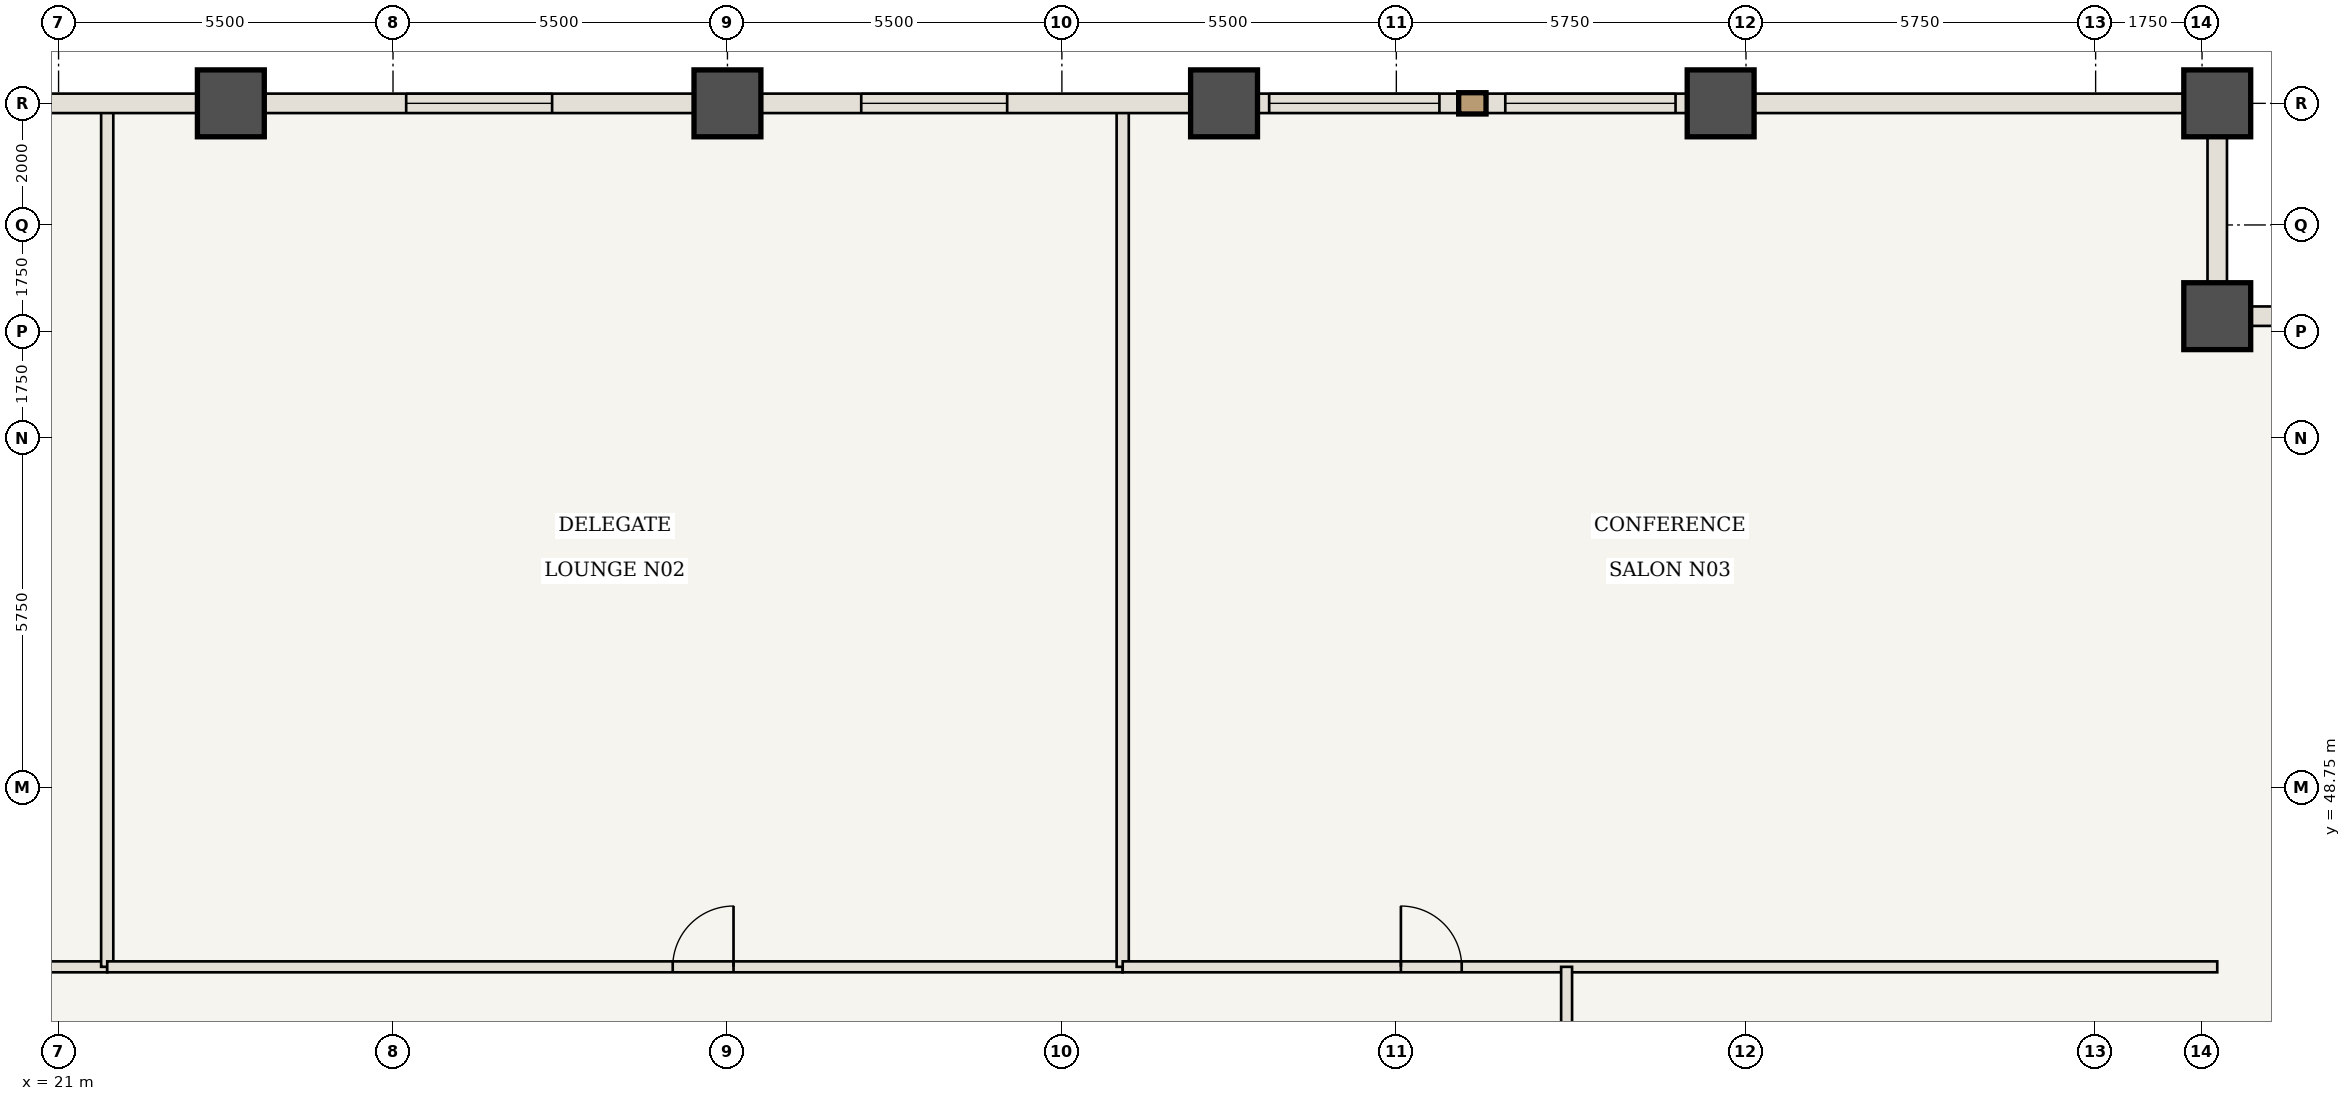
"""IFC4 building model, lengths in metres.
Left out: names, types, materials, properties, quantities, classifications, styles, units other than length and angle.
Written with IfcOpenShell. Run it as: python <this file> out.ifc"""

import sys

from ifc_helpers import new_model, si_unit, direction, frame, frame_2d, origin, origin_2d, place, context, subcontext, project, spatial, rectangle, extrude, element, fill, save


model = new_model("IFC4")
c1 = context("Model", 3, precision=1e-05, world=origin(), true_north=direction((0.0, 1.0)))
c2 = subcontext(c1, "Body", "Model", "MODEL_VIEW")
j1 = project(units=[si_unit("LENGTHUNIT", "METRE"), si_unit("PLANEANGLEUNIT", "RADIAN")], contexts=[c1])
p1 = place(None, origin())
s1 = spatial("IfcSite", under=j1, at=p1, CompositionType="ELEMENT")
p2 = place(p1, origin())
s2 = spatial("IfcBuilding", under=s1, at=p2, CompositionType="ELEMENT")
p3 = place(p2, frame((0.0, 0.0, 89.25)))
s3 = spatial("IfcBuildingStorey", under=s2, at=p3, CompositionType="ELEMENT", Elevation=89.25)
for number, where, z_axis, x_axis in (
    (1, (56.5, 56.5, 0.0), (0.0, 0.0, 1.0), (1.0, 0.0, 0.0)),
    (2, (56.5, 60.0, 0.0), (0.0, 0.0, 1.0), (1.0, 0.0, 0.0)),
    (3, (23.833, 60.0, 0.0), (0.0, 0.0, 1.0), (1.0, 0.0, 0.0)),
    (4, (32.0, 60.0, 0.0), (0.0, 0.0, 1.0), (1.0, 0.0, 0.0)),
    (5, (40.167, 60.0, 0.0), (0.0, 0.0, 1.0), (1.0, 0.0, 0.0)),
    (6, (48.333, 60.0, 0.0), (0.0, 0.0, 1.0), (1.0, 0.0, 0.0)),
):
    element("IfcColumn", number, at=place(p3, frame(where, z_axis=z_axis, x_axis=x_axis)), inside=s3, PredefinedType="COLUMN", context=c2, shape_type="SweptSolid", body=[
        extrude(rectangle(XDim=1.1, YDim=1.1, at=origin_2d()), origin(), (0.0, 0.0, 1.0), 3.5),
    ])
p4 = place(p3, frame((7.5, 45.8, 0.0), z_axis=(0.0, 0.0, 1.0), x_axis=(1.0, 0.0, 0.0)))
e7 = element("IfcWall", 7, at=p4, inside=s3, PredefinedType="STANDARD", context=c2, shape_type="SweptSolid", body=[
    extrude(rectangle(XDim=14.3, YDim=0.18, at=frame_2d((7.15, 0.0))), origin(), (0.0, 0.0, 1.0), 3.32),
])
p5 = place(p4, frame((12.025, 0.0, 0.0)))
e8 = element("IfcOpeningElement", 8, at=p5, cuts=e7, PredefinedType="OPENING", context=c2, shape_type="SweptSolid", body=[
    extrude(rectangle(XDim=1.0, YDim=2.15, at=frame_2d((0.5, 1.075))), frame((0.0, 0.1, 0.0), z_axis=(0.0, -1.0, 0.0), x_axis=(1.0, 0.0, 0.0)), (0.0, 0.0, 1.0), 0.2),
])
p6 = place(p3, frame((21.8, 45.8, 0.0), z_axis=(0.0, 0.0, 1.0), x_axis=(0.0, 1.0, 0.0)))
e9 = element("IfcWall", 9, at=p6, inside=s3, PredefinedType="STANDARD", context=c2, shape_type="SweptSolid", body=[
    extrude(rectangle(XDim=14.14, YDim=0.2, at=frame_2d((7.07, 0.0))), origin(), (0.0, 0.0, 1.0), 3.32),
])
p7 = place(p3, frame((21.8, 45.8, 0.0), z_axis=(0.0, 0.0, 1.0), x_axis=(1.0, 0.0, 0.0)))
e10 = element("IfcWall", 10, at=p7, inside=s3, PredefinedType="STANDARD", context=c2, shape_type="SweptSolid", body=[
    extrude(rectangle(XDim=16.7, YDim=0.18, at=frame_2d((8.35, 0.0))), origin(), (0.0, 0.0, 1.0), 3.32),
])
p8 = place(p7, frame((9.3, 0.0, 0.0)))
e11 = element("IfcOpeningElement", 11, at=p8, cuts=e10, PredefinedType="OPENING", context=c2, shape_type="SweptSolid", body=[
    extrude(rectangle(XDim=1.0, YDim=2.15, at=frame_2d((0.5, 1.075))), frame((0.0, 0.1, 0.0), z_axis=(0.0, -1.0, 0.0), x_axis=(1.0, 0.0, 0.0)), (0.0, 0.0, 1.0), 0.2),
])
p9 = place(p3, frame((38.5, 45.8, 0.0), z_axis=(0.0, 0.0, 1.0), x_axis=(0.0, 1.0, 0.0)))
e12 = element("IfcWall", 12, at=p9, inside=s3, PredefinedType="STANDARD", context=c2, shape_type="SweptSolid", body=[
    extrude(rectangle(XDim=14.14, YDim=0.2, at=frame_2d((7.07, 0.0))), origin(), (0.0, 0.0, 1.0), 3.32),
])
p10 = place(p3, frame((38.5, 45.8, 0.0), z_axis=(0.0, 0.0, 1.0), x_axis=(1.0, 0.0, 0.0)))
e13 = element("IfcWall", 13, at=p10, inside=s3, PredefinedType="STANDARD", context=c2, shape_type="SweptSolid", body=[
    extrude(rectangle(XDim=18.0, YDim=0.18, at=frame_2d((9.0, 0.0))), origin(), (0.0, 0.0, 1.0), 3.32),
])
p11 = place(p10, frame((4.575, 0.0, 0.0)))
e14 = element("IfcOpeningElement", 14, at=p11, cuts=e13, PredefinedType="OPENING", context=c2, shape_type="SweptSolid", body=[
    extrude(rectangle(XDim=1.0, YDim=2.15, at=frame_2d((0.5, 1.075))), frame((0.0, 0.1, 0.0), z_axis=(0.0, -1.0, 0.0), x_axis=(1.0, 0.0, 0.0)), (0.0, 0.0, 1.0), 0.2),
])
p12 = place(p3, frame((45.8, 37.5, 0.0), z_axis=(0.0, 0.0, 1.0), x_axis=(0.0, 1.0, 0.0)))
e15 = element("IfcWall", 15, at=p12, inside=s3, PredefinedType="STANDARD", context=c2, shape_type="SweptSolid", body=[
    extrude(rectangle(XDim=8.3, YDim=0.18, at=frame_2d((4.15, 0.0))), origin(), (0.0, 0.0, 1.0), 3.32),
])
p13 = place(p12, frame((3.65, 0.0, 0.0)))
e16 = element("IfcOpeningElement", 16, at=p13, cuts=e15, PredefinedType="OPENING", context=c2, shape_type="SweptSolid", body=[
    extrude(rectangle(XDim=1.0, YDim=2.15, at=frame_2d((0.5, 1.075))), frame((0.0, 0.1, 0.0), z_axis=(0.0, -1.0, 0.0), x_axis=(1.0, 0.0, 0.0)), (0.0, 0.0, 1.0), 0.2),
])
p14 = place(p3, frame((15.667, 60.0, 0.0), z_axis=(0.0, 0.0, 1.0), x_axis=(1.0, 0.0, 0.0)))
e17 = element("IfcWall", 17, at=p14, inside=s3, PredefinedType="USERDEFINED", context=c2, shape_type="SweptSolid", body=[
    extrude(rectangle(XDim=8.167, YDim=0.32, at=frame_2d((4.083, 0.0))), origin(), (0.0, 0.0, 1.0), 2.52),
])
p15 = place(p14, frame((0.742, 0.0, 0.85)))
e18 = element("IfcOpeningElement", 18, at=p15, cuts=e17, PredefinedType="OPENING", context=c2, shape_type="SweptSolid", body=[
    extrude(rectangle(XDim=2.8, YDim=1.47, at=frame_2d((1.4, 0.735))), frame((0.0, 0.17, 0.0), z_axis=(0.0, -1.0, 0.0), x_axis=(1.0, 0.0, 0.0)), (0.0, 0.0, 1.0), 0.34),
])
p16 = place(p3, frame((23.833, 60.0, 0.0), z_axis=(0.0, 0.0, 1.0), x_axis=(1.0, 0.0, 0.0)))
e19 = element("IfcWall", 19, at=p16, inside=s3, PredefinedType="USERDEFINED", context=c2, shape_type="SweptSolid", body=[
    extrude(rectangle(XDim=8.167, YDim=0.32, at=frame_2d((4.083, 0.0))), origin(), (0.0, 0.0, 1.0), 2.52),
])
p17 = place(p16, frame((2.883, 0.0, 0.85)))
e20 = element("IfcOpeningElement", 20, at=p17, cuts=e19, PredefinedType="OPENING", context=c2, shape_type="SweptSolid", body=[
    extrude(rectangle(XDim=2.4, YDim=1.47, at=frame_2d((1.2, 0.735))), frame((0.0, 0.17, 0.0), z_axis=(0.0, -1.0, 0.0), x_axis=(1.0, 0.0, 0.0)), (0.0, 0.0, 1.0), 0.34),
])
p18 = place(p3, frame((32.0, 60.0, 0.0), z_axis=(0.0, 0.0, 1.0), x_axis=(1.0, 0.0, 0.0)))
e21 = element("IfcWall", 21, at=p18, inside=s3, PredefinedType="USERDEFINED", context=c2, shape_type="SweptSolid", body=[
    extrude(rectangle(XDim=8.167, YDim=0.32, at=frame_2d((4.083, 0.0))), origin(), (0.0, 0.0, 1.0), 2.52),
])
p19 = place(p18, frame((2.2, 0.0, 0.85)))
e22 = element("IfcOpeningElement", 22, at=p19, cuts=e21, PredefinedType="OPENING", context=c2, shape_type="SweptSolid", body=[
    extrude(rectangle(XDim=2.4, YDim=1.47, at=frame_2d((1.2, 0.735))), frame((0.0, 0.17, 0.0), z_axis=(0.0, -1.0, 0.0), x_axis=(1.0, 0.0, 0.0)), (0.0, 0.0, 1.0), 0.34),
])
p20 = place(p3, frame((40.167, 60.0, 0.0), z_axis=(0.0, 0.0, 1.0), x_axis=(1.0, 0.0, 0.0)))
e23 = element("IfcWall", 23, at=p20, inside=s3, PredefinedType="USERDEFINED", context=c2, shape_type="SweptSolid", body=[
    extrude(rectangle(XDim=8.167, YDim=0.32, at=frame_2d((4.083, 0.0))), origin(), (0.0, 0.0, 1.0), 2.52),
])
p21 = place(p20, frame((0.742, 0.0, 0.85)))
e24 = element("IfcOpeningElement", 24, at=p21, cuts=e23, PredefinedType="OPENING", context=c2, shape_type="SweptSolid", body=[
    extrude(rectangle(XDim=2.8, YDim=1.47, at=frame_2d((1.4, 0.735))), frame((0.0, 0.17, 0.0), z_axis=(0.0, -1.0, 0.0), x_axis=(1.0, 0.0, 0.0)), (0.0, 0.0, 1.0), 0.34),
])
p22 = place(p20, frame((4.625, 0.0, 0.85)))
e25 = element("IfcOpeningElement", 25, at=p22, cuts=e23, PredefinedType="OPENING", context=c2, shape_type="SweptSolid", body=[
    extrude(rectangle(XDim=2.8, YDim=1.47, at=frame_2d((1.4, 0.735))), frame((0.0, 0.17, 0.0), z_axis=(0.0, -1.0, 0.0), x_axis=(1.0, 0.0, 0.0)), (0.0, 0.0, 1.0), 0.34),
])
p23 = place(p3, frame((48.333, 60.0, 0.0), z_axis=(0.0, 0.0, 1.0), x_axis=(1.0, 0.0, 0.0)))
e26 = element("IfcWall", 26, at=p23, inside=s3, PredefinedType="USERDEFINED", context=c2, shape_type="SweptSolid", body=[
    extrude(rectangle(XDim=8.167, YDim=0.32, at=frame_2d((4.083, 0.0))), origin(), (0.0, 0.0, 1.0), 2.52),
])
for number, where, z_axis, x_axis in (
    (27, (56.5, 56.5, 0.0), (0.0, 0.0, 1.0), (1.0, 0.0, 0.0)),
    (28, (56.5, 60.0, 0.0), (0.0, 0.0, 1.0), (0.0, -1.0, 0.0)),
):
    element("IfcWall", number, at=place(p3, frame(where, z_axis=z_axis, x_axis=x_axis)), inside=s3, PredefinedType="USERDEFINED", context=c2, shape_type="SweptSolid", body=[
        extrude(rectangle(XDim=3.5, YDim=0.32, at=frame_2d((1.75, 0.0))), origin(), (0.0, 0.0, 1.0), 2.52),
    ])
p24 = place(p8, origin())
e29 = element("IfcDoor", 29, at=p24, inside=s3, OperationType="SINGLE_SWING_RIGHT", PredefinedType="DOOR", context=c2, shape_type="SweptSolid", body=[
    extrude(rectangle(XDim=1.0, YDim=2.15, at=frame_2d((0.5, 1.075))), frame((0.0, 0.025, 0.0), z_axis=(0.0, -1.0, 0.0), x_axis=(1.0, 0.0, 0.0)), (0.0, 0.0, 1.0), 0.05),
])
fill(e11, e29)
p25 = place(p11, origin())
e30 = element("IfcDoor", 30, at=p25, inside=s3, OperationType="SINGLE_SWING_LEFT", PredefinedType="DOOR", context=c2, shape_type="SweptSolid", body=[
    extrude(rectangle(XDim=1.0, YDim=2.15, at=frame_2d((0.5, 1.075))), frame((0.0, 0.025, 0.0), z_axis=(0.0, -1.0, 0.0), x_axis=(1.0, 0.0, 0.0)), (0.0, 0.0, 1.0), 0.05),
])
fill(e14, e30)
p26 = place(p17, origin())
e31 = element("IfcWindow", 31, at=p26, inside=s3, PartitioningType="SINGLE_PANEL", PredefinedType="WINDOW", context=c2, shape_type="SweptSolid", body=[
    extrude(rectangle(XDim=2.4, YDim=1.47, at=frame_2d((1.2, 0.735))), frame((0.0, 0.03, 0.0), z_axis=(0.0, -1.0, 0.0), x_axis=(1.0, 0.0, 0.0)), (0.0, 0.0, 1.0), 0.06),
])
fill(e20, e31)
p27 = place(p19, origin())
e32 = element("IfcWindow", 32, at=p27, inside=s3, PartitioningType="SINGLE_PANEL", PredefinedType="WINDOW", context=c2, shape_type="SweptSolid", body=[
    extrude(rectangle(XDim=2.4, YDim=1.47, at=frame_2d((1.2, 0.735))), frame((0.0, 0.03, 0.0), z_axis=(0.0, -1.0, 0.0), x_axis=(1.0, 0.0, 0.0)), (0.0, 0.0, 1.0), 0.06),
])
fill(e22, e32)
p28 = place(p21, origin())
e33 = element("IfcWindow", 33, at=p28, inside=s3, PartitioningType="SINGLE_PANEL", PredefinedType="WINDOW", context=c2, shape_type="SweptSolid", body=[
    extrude(rectangle(XDim=2.8, YDim=1.47, at=frame_2d((1.4, 0.735))), frame((0.0, 0.03, 0.0), z_axis=(0.0, -1.0, 0.0), x_axis=(1.0, 0.0, 0.0)), (0.0, 0.0, 1.0), 0.06),
])
fill(e24, e33)
p29 = place(p22, origin())
e34 = element("IfcWindow", 34, at=p29, inside=s3, PartitioningType="SINGLE_PANEL", PredefinedType="WINDOW", context=c2, shape_type="SweptSolid", body=[
    extrude(rectangle(XDim=2.8, YDim=1.47, at=frame_2d((1.4, 0.735))), frame((0.0, 0.03, 0.0), z_axis=(0.0, -1.0, 0.0), x_axis=(1.0, 0.0, 0.0)), (0.0, 0.0, 1.0), 0.06),
])
fill(e25, e34)
save(model, sys.argv[1])
